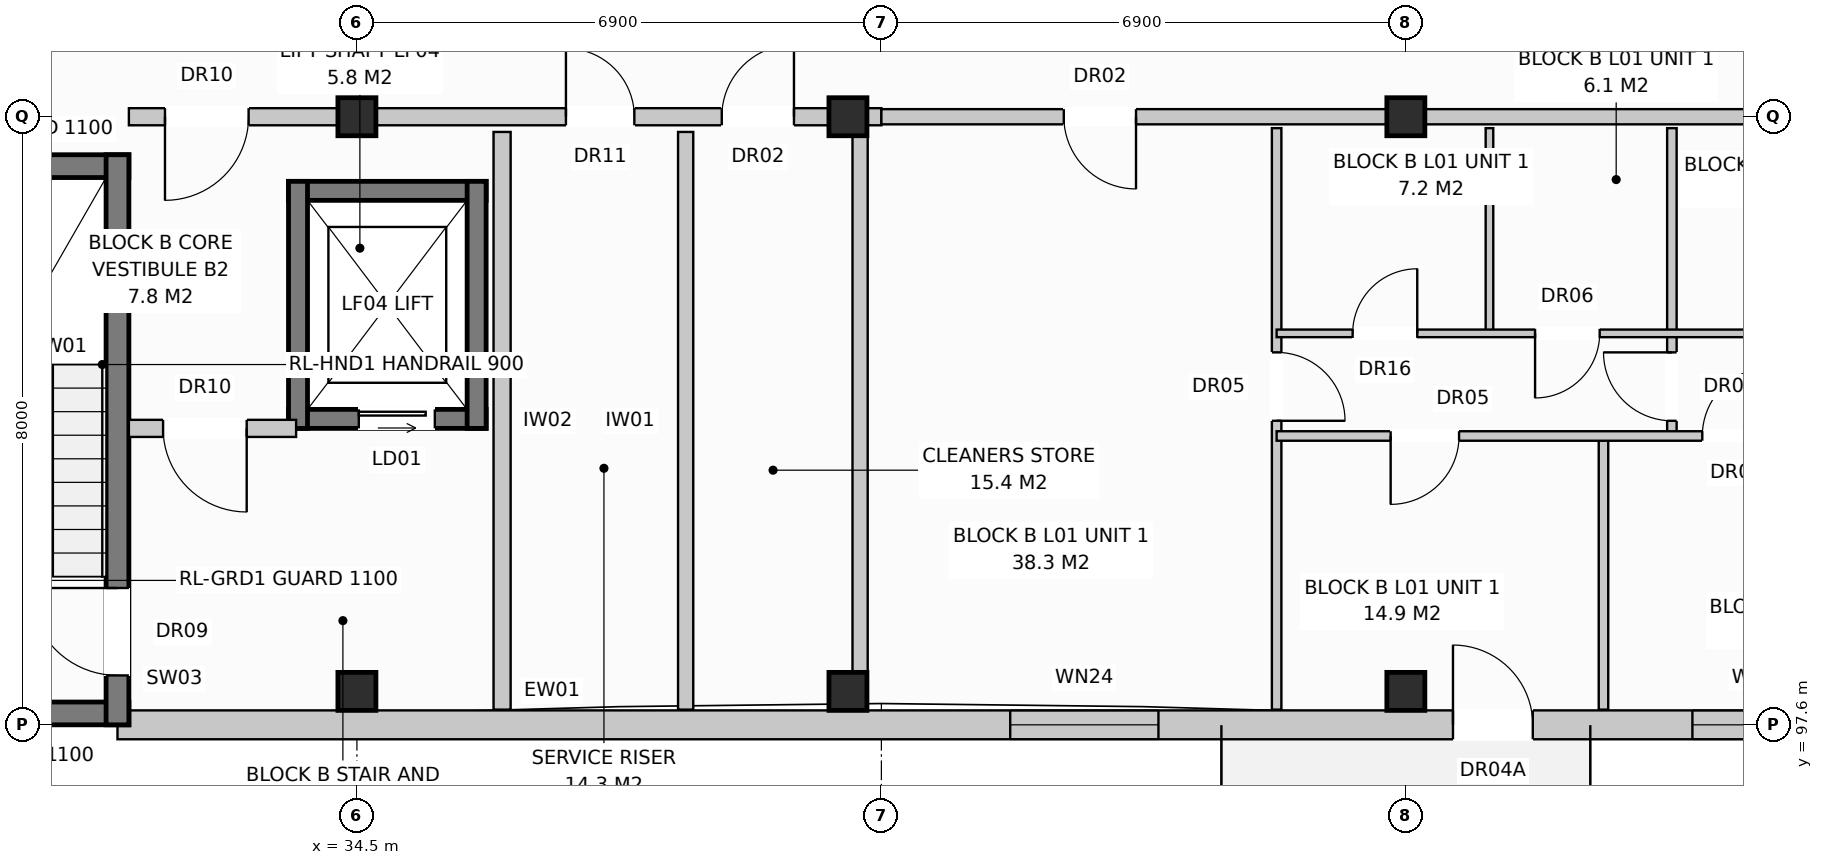
"""IFC4 building model, lengths in metres.
Left out: names, types, materials, properties, quantities, classifications, styles, units other than length and angle.
Written with IfcOpenShell. Run it as: python <this file> out.ifc"""

import sys

from ifc_helpers import new_model, si_unit, direction, frame, frame_2d, origin, origin_with_axes, origin_2d, place, context, subcontext, project, spatial, rectangle, extrude, element, fill, save


model = new_model("IFC4")
c1 = context("Model", 3, precision=1e-05, world=origin(), true_north=direction((0.0, 1.0)))
c2 = subcontext(c1, "Body", "Model", "MODEL_VIEW")
j1 = project(units=[si_unit("LENGTHUNIT", "METRE"), si_unit("PLANEANGLEUNIT", "RADIAN")], contexts=[c1])
p1 = place(None, origin())
s1 = spatial("IfcSite", under=j1, at=p1, CompositionType="ELEMENT")
p2 = place(p1, origin())
s2 = spatial("IfcBuilding", under=s1, at=p2, CompositionType="ELEMENT")
p3 = place(p2, frame((0.0, 0.0, 4.4)))
s3 = spatial("IfcBuildingStorey", under=s2, at=p3, CompositionType="ELEMENT", Elevation=4.4)
for number, where, z_axis, x_axis in (
    (1, (34.5, 98.04, 0.0), (0.0, 0.0, 1.0), (1.0, 0.0, 0.0)),
    (2, (34.5, 105.6, 0.0), (0.0, 0.0, 1.0), (1.0, 0.0, 0.0)),
    (3, (40.96, 98.04, 0.0), (0.0, 0.0, 1.0), (1.0, 0.0, 0.0)),
    (4, (40.96, 105.6, 0.0), (0.0, 0.0, 1.0), (1.0, 0.0, 0.0)),
    (5, (48.3, 98.04, 0.0), (0.0, 0.0, 1.0), (1.0, 0.0, 0.0)),
    (6, (48.3, 105.6, 0.0), (0.0, 0.0, 1.0), (1.0, 0.0, 0.0)),
):
    element("IfcColumn", number, at=place(p3, frame(where, z_axis=z_axis, x_axis=x_axis)), inside=s3, PredefinedType="COLUMN", context=c2, shape_type="SweptSolid", body=[
        extrude(rectangle(XDim=0.5, YDim=0.5, at=origin_2d()), origin(), (0.0, 0.0, 1.0), 3.6),
    ])
p4 = place(p3, frame((31.35, 97.6, 0.0), z_axis=(0.0, 0.0, 1.0), x_axis=(1.0, 0.0, 0.0)))
e7 = element("IfcWall", 7, at=p4, inside=s3, PredefinedType="STANDARD", context=c2, shape_type="SweptSolid", body=[
    extrude(rectangle(XDim=23.67, YDim=0.38, at=frame_2d((11.835, 0.0))), origin(), (0.0, 0.0, 1.0), 3.33),
])
p5 = place(p4, frame((17.57, 0.0, 0.0)))
e8 = element("IfcOpeningElement", 8, at=p5, cuts=e7, PredefinedType="OPENING", context=c2, shape_type="SweptSolid", body=[
    extrude(rectangle(XDim=1.05, YDim=2.12, at=frame_2d((0.525, 1.06))), frame((0.0, 0.202, 0.0), z_axis=(0.0, -1.0, 0.0), x_axis=(1.0, 0.0, 0.0)), (0.0, 0.0, 1.0), 0.404),
])
p6 = place(p4, frame((11.745, 0.0, 0.8)))
e9 = element("IfcOpeningElement", 9, at=p6, cuts=e7, PredefinedType="OPENING", context=c2, shape_type="SweptSolid", body=[
    extrude(rectangle(XDim=1.95, YDim=1.65, at=frame_2d((0.975, 0.825))), frame((0.0, 0.202, 0.0), z_axis=(0.0, -1.0, 0.0), x_axis=(1.0, 0.0, 0.0)), (0.0, 0.0, 1.0), 0.404),
])
p7 = place(p4, frame((20.72, 0.0, 0.8)))
e10 = element("IfcOpeningElement", 10, at=p7, cuts=e7, PredefinedType="OPENING", context=c2, shape_type="SweptSolid", body=[
    extrude(rectangle(XDim=1.8, YDim=1.7, at=frame_2d((0.9, 0.85))), frame((0.0, 0.202, 0.0), z_axis=(0.0, -1.0, 0.0), x_axis=(1.0, 0.0, 0.0)), (0.0, 0.0, 1.0), 0.404),
])
for number, where, z_axis, x_axis in (
    (11, (27.9, 97.75, 0.0), (0.0, 0.0, 1.0), (1.0, 0.0, 0.0)),
    (12, (27.9, 104.95, 0.0), (0.0, 0.0, 1.0), (1.0, 0.0, 0.0)),
):
    element("IfcWall", number, at=place(p3, frame(where, z_axis=z_axis, x_axis=x_axis)), inside=s3, PredefinedType="SHEAR", context=c2, shape_type="SweptSolid", body=[
        extrude(rectangle(XDim=3.6, YDim=0.3, at=frame_2d((1.8, 0.0))), origin(), (0.0, 0.0, 1.0), 3.33),
    ])
p8 = place(p3, frame((31.35, 97.6, 0.0), z_axis=(0.0, 0.0, 1.0), x_axis=(0.0, 1.0, 0.0)))
e13 = element("IfcWall", 13, at=p8, inside=s3, PredefinedType="SHEAR", context=c2, shape_type="SweptSolid", body=[
    extrude(rectangle(XDim=7.5, YDim=0.3, at=frame_2d((3.75, 0.0))), origin(), (0.0, 0.0, 1.0), 3.33),
])
p9 = place(p8, frame((0.65, 0.0, 0.0)))
e14 = element("IfcOpeningElement", 14, at=p9, cuts=e13, PredefinedType="OPENING", context=c2, shape_type="SweptSolid", body=[
    extrude(rectangle(XDim=1.15, YDim=2.15, at=frame_2d((0.575, 1.075))), frame((0.0, 0.162, 0.0), z_axis=(0.0, -1.0, 0.0), x_axis=(1.0, 0.0, 0.0)), (0.0, 0.0, 1.0), 0.324),
])
p10 = place(p3, frame((33.6, 101.625, 0.0), z_axis=(0.0, 0.0, 1.0), x_axis=(1.0, 0.0, 0.0)))
e15 = element("IfcWall", 15, at=p10, inside=s3, PredefinedType="SHEAR", context=c2, shape_type="SweptSolid", body=[
    extrude(rectangle(XDim=2.6, YDim=0.25, at=frame_2d((1.3, 0.0))), origin(), (0.0, 0.0, 1.0), 3.33),
])
p11 = place(p10, frame((0.925, 0.0, 0.0)))
e16 = element("IfcOpeningElement", 16, at=p11, cuts=e15, PredefinedType="OPENING", context=c2, shape_type="SweptSolid", body=[
    extrude(rectangle(XDim=1.0, YDim=2.1, at=frame_2d((0.5, 1.05))), frame((0.0, 0.137, 0.0), z_axis=(0.0, -1.0, 0.0), x_axis=(1.0, 0.0, 0.0)), (0.0, 0.0, 1.0), 0.274),
])
p12 = place(p3, frame((33.6, 104.625, 0.0), z_axis=(0.0, 0.0, 1.0), x_axis=(1.0, 0.0, 0.0)))
e17 = element("IfcWall", 17, at=p12, inside=s3, PredefinedType="SHEAR", context=c2, shape_type="SweptSolid", body=[
    extrude(rectangle(XDim=2.6, YDim=0.25, at=frame_2d((1.3, 0.0))), origin(), (0.0, 0.0, 1.0), 3.33),
])
for number, where, z_axis, x_axis in (
    (18, (33.725, 101.5, 0.0), (0.0, 0.0, 1.0), (0.0, 1.0, 0.0)),
    (19, (36.075, 101.5, 0.0), (0.0, 0.0, 1.0), (0.0, 1.0, 0.0)),
):
    element("IfcWall", number, at=place(p3, frame(where, z_axis=z_axis, x_axis=x_axis)), inside=s3, PredefinedType="SHEAR", context=c2, shape_type="SweptSolid", body=[
        extrude(rectangle(XDim=3.25, YDim=0.25, at=frame_2d((1.625, 0.0))), origin(), (0.0, 0.0, 1.0), 3.33),
    ])
p13 = place(p3, frame((36.41, 97.8, 0.0), z_axis=(0.0, 0.0, 1.0), x_axis=(0.0, 1.0, 0.0)))
e20 = element("IfcWall", 20, at=p13, inside=s3, PredefinedType="PARTITIONING", context=c2, shape_type="SweptSolid", body=[
    extrude(rectangle(XDim=7.6, YDim=0.225, at=frame_2d((3.8, 0.0))), origin(), (0.0, 0.0, 1.0), 2.99),
])
p14 = place(p3, frame((31.5, 101.5, 0.0), z_axis=(0.0, 0.0, 1.0), x_axis=(1.0, 0.0, 0.0)))
e21 = element("IfcWall", 21, at=p14, inside=s3, PredefinedType="PARTITIONING", context=c2, shape_type="SweptSolid", body=[
    extrude(rectangle(XDim=2.2, YDim=0.225, at=frame_2d((1.1, 0.0))), origin(), (0.0, 0.0, 1.0), 3.33),
])
p15 = place(p14, frame((0.45, 0.0, 0.0)))
e22 = element("IfcOpeningElement", 22, at=p15, cuts=e21, PredefinedType="OPENING", context=c2, shape_type="SweptSolid", body=[
    extrude(rectangle(XDim=1.1, YDim=2.15, at=frame_2d((0.55, 1.075))), frame((0.0, 0.125, 0.0), z_axis=(0.0, -1.0, 0.0), x_axis=(1.0, 0.0, 0.0)), (0.0, 0.0, 1.0), 0.249),
])
for number, where, z_axis, x_axis in (
    (23, (38.825, 97.8, 0.0), (0.0, 0.0, 1.0), (0.0, 1.0, 0.0)),
    (24, (41.12, 97.8, 0.0), (0.0, 0.0, 1.0), (0.0, 1.0, 0.0)),
):
    element("IfcWall", number, at=place(p3, frame(where, z_axis=z_axis, x_axis=x_axis)), inside=s3, PredefinedType="PARTITIONING", context=c2, shape_type="SweptSolid", body=[
        extrude(rectangle(XDim=7.6, YDim=0.2, at=frame_2d((3.8, 0.0))), origin(), (0.0, 0.0, 1.0), 3.33),
    ])
p16 = place(p3, frame((31.5, 105.6, 0.0), z_axis=(0.0, 0.0, 1.0), x_axis=(1.0, 0.0, 0.0)))
e25 = element("IfcWall", 25, at=p16, inside=s3, PredefinedType="PARTITIONING", context=c2, shape_type="SweptSolid", body=[
    extrude(rectangle(XDim=9.9, YDim=0.225, at=frame_2d((4.95, 0.0))), origin(), (0.0, 0.0, 1.0), 2.77),
])
p17 = place(p16, frame((0.475, 0.0, 0.0)))
e26 = element("IfcOpeningElement", 26, at=p17, cuts=e25, PredefinedType="OPENING", context=c2, shape_type="SweptSolid", body=[
    extrude(rectangle(XDim=1.1, YDim=2.15, at=frame_2d((0.55, 1.075))), frame((0.0, 0.125, 0.0), z_axis=(0.0, -1.0, 0.0), x_axis=(1.0, 0.0, 0.0)), (0.0, 0.0, 1.0), 0.249),
])
p18 = place(p16, frame((5.75, 0.0, 0.0)))
e27 = element("IfcOpeningElement", 27, at=p18, cuts=e25, PredefinedType="OPENING", context=c2, shape_type="SweptSolid", body=[
    extrude(rectangle(XDim=0.9, YDim=2.1, at=frame_2d((0.45, 1.05))), frame((0.0, 0.125, 0.0), z_axis=(0.0, -1.0, 0.0), x_axis=(1.0, 0.0, 0.0)), (0.0, 0.0, 1.0), 0.249),
])
p19 = place(p16, frame((7.8, 0.0, 0.0)))
e28 = element("IfcOpeningElement", 28, at=p19, cuts=e25, PredefinedType="OPENING", context=c2, shape_type="SweptSolid", body=[
    extrude(rectangle(XDim=0.95, YDim=2.15, at=frame_2d((0.475, 1.075))), frame((0.0, 0.125, 0.0), z_axis=(0.0, -1.0, 0.0), x_axis=(1.0, 0.0, 0.0)), (0.0, 0.0, 1.0), 0.249),
])
p20 = place(p3, frame((41.4, 105.6, 0.0), z_axis=(0.0, 0.0, 1.0), x_axis=(1.0, 0.0, 0.0)))
e29 = element("IfcWall", 29, at=p20, inside=s3, PredefinedType="PARTITIONING", context=c2, shape_type="SweptSolid", body=[
    extrude(rectangle(XDim=13.8, YDim=0.2, at=frame_2d((6.9, 0.0))), origin(), (0.0, 0.0, 1.0), 2.77),
])
p21 = place(p20, frame((2.4, 0.0, 0.0)))
e30 = element("IfcOpeningElement", 30, at=p21, cuts=e29, PredefinedType="OPENING", context=c2, shape_type="SweptSolid", body=[
    extrude(rectangle(XDim=0.95, YDim=2.15, at=frame_2d((0.475, 1.075))), frame((0.0, 0.112, 0.0), z_axis=(0.0, -1.0, 0.0), x_axis=(1.0, 0.0, 0.0)), (0.0, 0.0, 1.0), 0.224),
])
p22 = place(p3, frame((46.6, 105.45, 0.0), z_axis=(0.0, 0.0, 1.0), x_axis=(0.0, -1.0, 0.0)))
e31 = element("IfcWall", 31, at=p22, inside=s3, PredefinedType="PARTITIONING", context=c2, shape_type="SweptSolid", body=[
    extrude(rectangle(XDim=7.65, YDim=0.125, at=frame_2d((3.825, 0.0))), origin(), (0.0, 0.0, 1.0), 3.33),
])
p23 = place(p22, frame((2.95, 0.0, 0.0)))
e32 = element("IfcOpeningElement", 32, at=p23, cuts=e31, PredefinedType="OPENING", context=c2, shape_type="SweptSolid", body=[
    extrude(rectangle(XDim=0.9, YDim=2.1, at=frame_2d((0.45, 1.05))), frame((0.0, 0.074, 0.0), z_axis=(0.0, -1.0, 0.0), x_axis=(1.0, 0.0, 0.0)), (0.0, 0.0, 1.0), 0.149),
])
p24 = place(p3, frame((49.4, 105.45, 0.0), z_axis=(0.0, 0.0, 1.0), x_axis=(0.0, -1.0, 0.0)))
e33 = element("IfcWall", 33, at=p24, inside=s3, PredefinedType="PARTITIONING", context=c2, shape_type="SweptSolid", body=[
    extrude(rectangle(XDim=2.7, YDim=0.1, at=frame_2d((1.35, 0.0))), origin(), (0.0, 0.0, 1.0), 3.33),
])
p25 = place(p3, frame((51.8, 105.45, 0.0), z_axis=(0.0, 0.0, 1.0), x_axis=(0.0, -1.0, 0.0)))
e34 = element("IfcWall", 34, at=p25, inside=s3, PredefinedType="PARTITIONING", context=c2, shape_type="SweptSolid", body=[
    extrude(rectangle(XDim=4.05, YDim=0.125, at=frame_2d((2.025, 0.0))), origin(), (0.0, 0.0, 1.0), 2.99),
])
p26 = place(p25, frame((2.95, 0.0, 0.0)))
e35 = element("IfcOpeningElement", 35, at=p26, cuts=e34, PredefinedType="OPENING", context=c2, shape_type="SweptSolid", body=[
    extrude(rectangle(XDim=0.9, YDim=2.1, at=frame_2d((0.45, 1.05))), frame((0.0, 0.074, 0.0), z_axis=(0.0, -1.0, 0.0), x_axis=(1.0, 0.0, 0.0)), (0.0, 0.0, 1.0), 0.149),
])
p27 = place(p3, frame((50.9, 101.4, 0.0), z_axis=(0.0, 0.0, 1.0), x_axis=(0.0, -1.0, 0.0)))
e36 = element("IfcWall", 36, at=p27, inside=s3, PredefinedType="PARTITIONING", context=c2, shape_type="SweptSolid", body=[
    extrude(rectangle(XDim=3.6, YDim=0.125, at=frame_2d((1.8, 0.0))), origin(), (0.0, 0.0, 1.0), 3.33),
])
p28 = place(p3, frame((46.6, 102.75, 0.0), z_axis=(0.0, 0.0, 1.0), x_axis=(1.0, 0.0, 0.0)))
e37 = element("IfcWall", 37, at=p28, inside=s3, PredefinedType="PARTITIONING", context=c2, shape_type="SweptSolid", body=[
    extrude(rectangle(XDim=8.5, YDim=0.1, at=frame_2d((4.25, 0.0))), origin(), (0.0, 0.0, 1.0), 3.33),
])
p29 = place(p28, frame((1.0, 0.0, 0.0)))
e38 = element("IfcOpeningElement", 38, at=p29, cuts=e37, PredefinedType="OPENING", context=c2, shape_type="SweptSolid", body=[
    extrude(rectangle(XDim=0.85, YDim=2.1, at=frame_2d((0.425, 1.05))), frame((0.0, 0.062, 0.0), z_axis=(0.0, -1.0, 0.0), x_axis=(1.0, 0.0, 0.0)), (0.0, 0.0, 1.0), 0.124),
])
p30 = place(p28, frame((3.4, 0.0, 0.0)))
e39 = element("IfcOpeningElement", 39, at=p30, cuts=e37, PredefinedType="OPENING", context=c2, shape_type="SweptSolid", body=[
    extrude(rectangle(XDim=0.85, YDim=2.05, at=frame_2d((0.425, 1.025))), frame((0.0, 0.062, 0.0), z_axis=(0.0, -1.0, 0.0), x_axis=(1.0, 0.0, 0.0)), (0.0, 0.0, 1.0), 0.124),
])
p31 = place(p28, frame((6.2, 0.0, 0.0)))
e40 = element("IfcOpeningElement", 40, at=p31, cuts=e37, PredefinedType="OPENING", context=c2, shape_type="SweptSolid", body=[
    extrude(rectangle(XDim=0.85, YDim=2.05, at=frame_2d((0.425, 1.025))), frame((0.0, 0.062, 0.0), z_axis=(0.0, -1.0, 0.0), x_axis=(1.0, 0.0, 0.0)), (0.0, 0.0, 1.0), 0.124),
])
p32 = place(p3, frame((46.6, 101.4, 0.0), z_axis=(0.0, 0.0, 1.0), x_axis=(1.0, 0.0, 0.0)))
e41 = element("IfcWall", 41, at=p32, inside=s3, PredefinedType="PARTITIONING", context=c2, shape_type="SweptSolid", body=[
    extrude(rectangle(XDim=8.5, YDim=0.125, at=frame_2d((4.25, 0.0))), origin(), (0.0, 0.0, 1.0), 3.33),
])
p33 = place(p32, frame((1.5, 0.0, 0.0)))
e42 = element("IfcOpeningElement", 42, at=p33, cuts=e41, PredefinedType="OPENING", context=c2, shape_type="SweptSolid", body=[
    extrude(rectangle(XDim=0.9, YDim=2.1, at=frame_2d((0.45, 1.05))), frame((0.0, 0.074, 0.0), z_axis=(0.0, -1.0, 0.0), x_axis=(1.0, 0.0, 0.0)), (0.0, 0.0, 1.0), 0.149),
])
p34 = place(p32, frame((5.6, 0.0, 0.0)))
e43 = element("IfcOpeningElement", 43, at=p34, cuts=e41, PredefinedType="OPENING", context=c2, shape_type="SweptSolid", body=[
    extrude(rectangle(XDim=0.9, YDim=2.1, at=frame_2d((0.45, 1.05))), frame((0.0, 0.074, 0.0), z_axis=(0.0, -1.0, 0.0), x_axis=(1.0, 0.0, 0.0)), (0.0, 0.0, 1.0), 0.149),
])
p35 = place(p5, origin_with_axes())
e44 = element("IfcDoor", 44, at=p35, inside=s3, OperationType="SINGLE_SWING_LEFT", PredefinedType="DOOR", context=c2, shape_type="SweptSolid", body=[
    extrude(rectangle(XDim=1.05, YDim=2.12, at=frame_2d((0.525, 1.06))), frame((0.0, 0.025, 0.0), z_axis=(0.0, -1.0, 0.0), x_axis=(1.0, 0.0, 0.0)), (0.0, 0.0, 1.0), 0.05),
])
fill(e8, e44)
p36 = place(p6, origin_with_axes())
e45 = element("IfcWindow", 45, at=p36, inside=s3, PartitioningType="SINGLE_PANEL", PredefinedType="WINDOW", context=c2, shape_type="SweptSolid", body=[
    extrude(rectangle(XDim=1.95, YDim=1.65, at=frame_2d((0.975, 0.825))), frame((0.0, 0.03, 0.0), z_axis=(0.0, -1.0, 0.0), x_axis=(1.0, 0.0, 0.0)), (0.0, 0.0, 1.0), 0.06),
])
fill(e9, e45)
p37 = place(p7, origin_with_axes())
e46 = element("IfcWindow", 46, at=p37, inside=s3, PartitioningType="SINGLE_PANEL", PredefinedType="WINDOW", context=c2, shape_type="SweptSolid", body=[
    extrude(rectangle(XDim=1.8, YDim=1.7, at=frame_2d((0.9, 0.85))), frame((0.0, 0.03, 0.0), z_axis=(0.0, -1.0, 0.0), x_axis=(1.0, 0.0, 0.0)), (0.0, 0.0, 1.0), 0.06),
])
fill(e10, e46)
p38 = place(p9, origin_with_axes())
e47 = element("IfcDoor", 47, at=p38, inside=s3, OperationType="SINGLE_SWING_RIGHT", PredefinedType="DOOR", context=c2, shape_type="SweptSolid", body=[
    extrude(rectangle(XDim=1.15, YDim=2.15, at=frame_2d((0.575, 1.075))), frame((0.0, 0.025, 0.0), z_axis=(0.0, -1.0, 0.0), x_axis=(1.0, 0.0, 0.0)), (0.0, 0.0, 1.0), 0.05),
])
fill(e14, e47)
p39 = place(p11, origin_with_axes())
e48 = element("IfcDoor", 48, at=p39, inside=s3, OperationType="SLIDING_TO_LEFT", PredefinedType="DOOR", context=c2, shape_type="SweptSolid", body=[
    extrude(rectangle(XDim=1.0, YDim=2.1, at=frame_2d((0.5, 1.05))), frame((0.0, 0.025, 0.0), z_axis=(0.0, -1.0, 0.0), x_axis=(1.0, 0.0, 0.0)), (0.0, 0.0, 1.0), 0.05),
])
fill(e16, e48)
p40 = place(p15, frame((1.1, 0.0, 0.0), z_axis=(0.0, 0.0, 1.0), x_axis=(-1.0, 0.0, 0.0)))
e49 = element("IfcDoor", 49, at=p40, inside=s3, OperationType="SINGLE_SWING_RIGHT", PredefinedType="DOOR", context=c2, shape_type="SweptSolid", body=[
    extrude(rectangle(XDim=1.1, YDim=2.15, at=frame_2d((0.55, 1.075))), frame((0.0, 0.025, 0.0), z_axis=(0.0, -1.0, 0.0), x_axis=(1.0, 0.0, 0.0)), (0.0, 0.0, 1.0), 0.05),
])
fill(e22, e49)
p41 = place(p17, frame((1.1, 0.0, 0.0), z_axis=(0.0, 0.0, 1.0), x_axis=(-1.0, 0.0, 0.0)))
e50 = element("IfcDoor", 50, at=p41, inside=s3, OperationType="SINGLE_SWING_LEFT", PredefinedType="DOOR", context=c2, shape_type="SweptSolid", body=[
    extrude(rectangle(XDim=1.1, YDim=2.15, at=frame_2d((0.55, 1.075))), frame((0.0, 0.025, 0.0), z_axis=(0.0, -1.0, 0.0), x_axis=(1.0, 0.0, 0.0)), (0.0, 0.0, 1.0), 0.05),
])
fill(e26, e50)
p42 = place(p18, origin_with_axes())
e51 = element("IfcDoor", 51, at=p42, inside=s3, OperationType="SINGLE_SWING_LEFT", PredefinedType="DOOR", context=c2, shape_type="SweptSolid", body=[
    extrude(rectangle(XDim=0.9, YDim=2.1, at=frame_2d((0.45, 1.05))), frame((0.0, 0.025, 0.0), z_axis=(0.0, -1.0, 0.0), x_axis=(1.0, 0.0, 0.0)), (0.0, 0.0, 1.0), 0.05),
])
fill(e27, e51)
p43 = place(p19, origin_with_axes())
e52 = element("IfcDoor", 52, at=p43, inside=s3, OperationType="SINGLE_SWING_RIGHT", PredefinedType="DOOR", context=c2, shape_type="SweptSolid", body=[
    extrude(rectangle(XDim=0.95, YDim=2.15, at=frame_2d((0.475, 1.075))), frame((0.0, 0.025, 0.0), z_axis=(0.0, -1.0, 0.0), x_axis=(1.0, 0.0, 0.0)), (0.0, 0.0, 1.0), 0.05),
])
fill(e28, e52)
p44 = place(p21, frame((0.95, 0.0, 0.0), z_axis=(0.0, 0.0, 1.0), x_axis=(-1.0, 0.0, 0.0)))
e53 = element("IfcDoor", 53, at=p44, inside=s3, OperationType="SINGLE_SWING_RIGHT", PredefinedType="DOOR", context=c2, shape_type="SweptSolid", body=[
    extrude(rectangle(XDim=0.95, YDim=2.15, at=frame_2d((0.475, 1.075))), frame((0.0, 0.025, 0.0), z_axis=(0.0, -1.0, 0.0), x_axis=(1.0, 0.0, 0.0)), (0.0, 0.0, 1.0), 0.05),
])
fill(e30, e53)
p45 = place(p23, origin_with_axes())
e54 = element("IfcDoor", 54, at=p45, inside=s3, OperationType="SINGLE_SWING_RIGHT", PredefinedType="DOOR", context=c2, shape_type="SweptSolid", body=[
    extrude(rectangle(XDim=0.9, YDim=2.1, at=frame_2d((0.45, 1.05))), frame((0.0, 0.025, 0.0), z_axis=(0.0, -1.0, 0.0), x_axis=(1.0, 0.0, 0.0)), (0.0, 0.0, 1.0), 0.05),
])
fill(e32, e54)
p46 = place(p26, frame((0.9, 0.0, 0.0), z_axis=(0.0, 0.0, 1.0), x_axis=(-1.0, 0.0, 0.0)))
e55 = element("IfcDoor", 55, at=p46, inside=s3, OperationType="SINGLE_SWING_LEFT", PredefinedType="DOOR", context=c2, shape_type="SweptSolid", body=[
    extrude(rectangle(XDim=0.9, YDim=2.1, at=frame_2d((0.45, 1.05))), frame((0.0, 0.025, 0.0), z_axis=(0.0, -1.0, 0.0), x_axis=(1.0, 0.0, 0.0)), (0.0, 0.0, 1.0), 0.05),
])
fill(e35, e55)
p47 = place(p29, origin_with_axes())
e56 = element("IfcDoor", 56, at=p47, inside=s3, OperationType="SINGLE_SWING_RIGHT", PredefinedType="DOOR", context=c2, shape_type="SweptSolid", body=[
    extrude(rectangle(XDim=0.85, YDim=2.1, at=frame_2d((0.425, 1.05))), frame((0.0, 0.025, 0.0), z_axis=(0.0, -1.0, 0.0), x_axis=(1.0, 0.0, 0.0)), (0.0, 0.0, 1.0), 0.05),
])
fill(e38, e56)
p48 = place(p30, frame((0.85, 0.0, 0.0), z_axis=(0.0, 0.0, 1.0), x_axis=(-1.0, 0.0, 0.0)))
e57 = element("IfcDoor", 57, at=p48, inside=s3, OperationType="SINGLE_SWING_LEFT", PredefinedType="DOOR", context=c2, shape_type="SweptSolid", body=[
    extrude(rectangle(XDim=0.85, YDim=2.05, at=frame_2d((0.425, 1.025))), frame((0.0, 0.025, 0.0), z_axis=(0.0, -1.0, 0.0), x_axis=(1.0, 0.0, 0.0)), (0.0, 0.0, 1.0), 0.05),
])
fill(e39, e57)
p49 = place(p33, frame((0.9, 0.0, 0.0), z_axis=(0.0, 0.0, 1.0), x_axis=(-1.0, 0.0, 0.0)))
e58 = element("IfcDoor", 58, at=p49, inside=s3, OperationType="SINGLE_SWING_LEFT", PredefinedType="DOOR", context=c2, shape_type="SweptSolid", body=[
    extrude(rectangle(XDim=0.9, YDim=2.1, at=frame_2d((0.45, 1.05))), frame((0.0, 0.025, 0.0), z_axis=(0.0, -1.0, 0.0), x_axis=(1.0, 0.0, 0.0)), (0.0, 0.0, 1.0), 0.05),
])
fill(e42, e58)
p50 = place(p34, origin_with_axes())
e59 = element("IfcDoor", 59, at=p50, inside=s3, OperationType="SINGLE_SWING_RIGHT", PredefinedType="DOOR", context=c2, shape_type="SweptSolid", body=[
    extrude(rectangle(XDim=0.9, YDim=2.1, at=frame_2d((0.45, 1.05))), frame((0.0, 0.025, 0.0), z_axis=(0.0, -1.0, 0.0), x_axis=(1.0, 0.0, 0.0)), (0.0, 0.0, 1.0), 0.05),
])
fill(e43, e59)
save(model, sys.argv[1])
